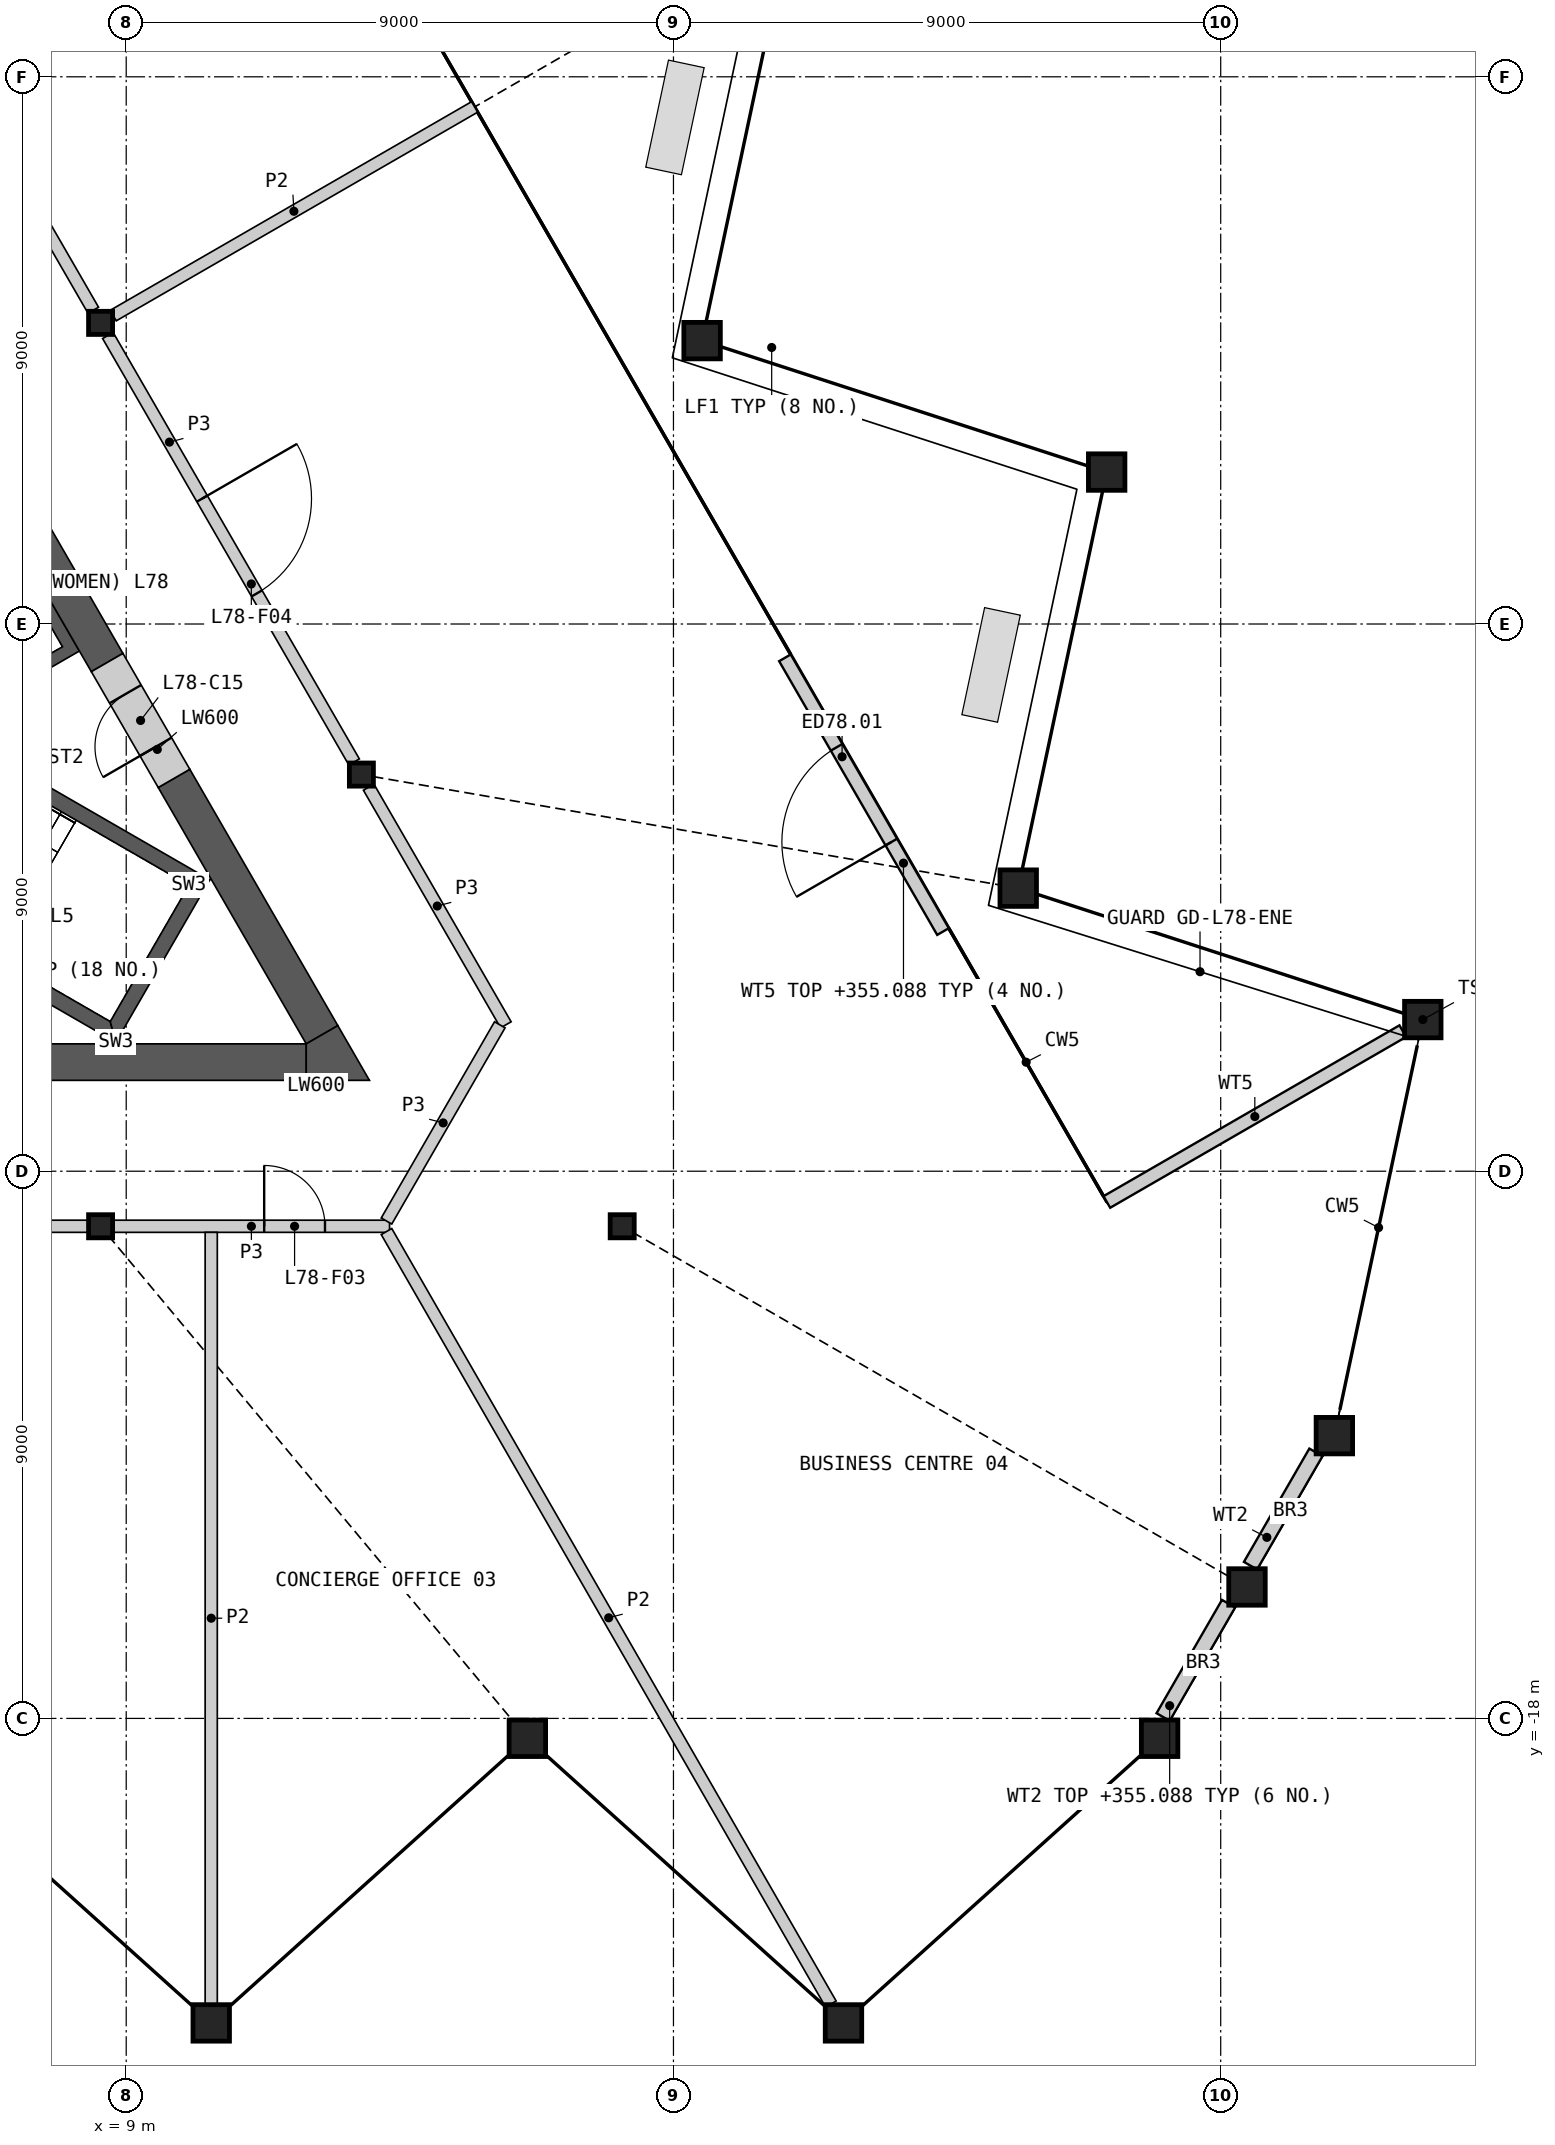
"""IFC4 building model, lengths in metres.
Left out: names, types, materials, properties, quantities, classifications, styles, units other than length and angle.
Written with IfcOpenShell. Run it as: python <this file> out.ifc"""

import sys

from ifc_helpers import new_model, si_unit, direction, frame, frame_2d, origin, origin_2d, place, context, subcontext, project, spatial, polyline, rectangle, hollow_rectangle, i_section, outline, extrude, element, fill, save


model = new_model("IFC4")
c1 = context("Model", 3, precision=1e-05, world=origin(), true_north=direction((0.0, 1.0)))
c2 = subcontext(c1, "Body", "Model", "MODEL_VIEW")
j1 = project(units=[si_unit("LENGTHUNIT", "METRE"), si_unit("PLANEANGLEUNIT", "RADIAN")], contexts=[c1])
p1 = place(None, origin())
s1 = spatial("IfcSite", under=j1, at=p1, CompositionType="ELEMENT")
p2 = place(p1, origin())
s2 = spatial("IfcBuilding", under=s1, at=p2, CompositionType="ELEMENT")
p3 = place(p2, frame((0.0, 0.0, 346.0)))
s3 = spatial("IfcBuildingStorey", under=s2, at=p3, CompositionType="ELEMENT", Elevation=346.0)
for number, where, z_axis, x_axis in (
    (1, (10.398, -23.008, 0.0), (0.0, 0.0, 1.0), (1.0, 0.0, 0.0)),
    (2, (15.597, -18.327, 0.0), (0.0, 0.0, 1.0), (1.0, 0.0, 0.0)),
    (3, (20.796, -23.008, 0.0), (0.0, 0.0, 1.0), (1.0, 0.0, 0.0)),
    (4, (25.995, -18.327, 0.0), (0.0, 0.0, 1.0), (1.0, 0.0, 0.0)),
    (5, (27.432, -15.838, 0.0), (0.0, 0.0, 1.0), (1.0, 0.0, 0.0)),
    (6, (28.869, -13.349, 0.0), (0.0, 0.0, 1.0), (1.0, 0.0, 0.0)),
    (7, (30.324, -6.506, 0.0), (0.0, 0.0, 1.0), (1.0, 0.0, 0.0)),
    (8, (23.67, -4.344, 0.0), (0.0, 0.0, 1.0), (1.0, 0.0, 0.0)),
    (9, (25.125, 2.499, 0.0), (0.0, 0.0, 1.0), (1.0, 0.0, 0.0)),
    (10, (18.471, 4.661, 0.0), (0.0, 0.0, 1.0), (1.0, 0.0, 0.0)),
):
    element("IfcColumn", number, at=place(p3, frame(where, z_axis=z_axis, x_axis=x_axis)), inside=s3, PredefinedType="COLUMN", context=c2, shape_type="SweptSolid", body=[
        extrude(hollow_rectangle(XDim=0.6, YDim=0.6, WallThickness=0.04, at=origin_2d()), origin(), (0.0, 0.0, 1.0), 10.0),
    ])
for number, where, z_axis, x_axis in (
    (11, (8.578, -9.906, 0.0), (0.0, 0.0, 1.0), (1.0, 0.0, 0.0)),
    (12, (17.157, -9.906, 0.0), (0.0, 0.0, 1.0), (1.0, 0.0, 0.0)),
    (13, (12.868, -2.476, 0.0), (0.0, 0.0, 1.0), (1.0, 0.0, 0.0)),
    (14, (8.578, 4.953, 0.0), (0.0, 0.0, 1.0), (1.0, 0.0, 0.0)),
):
    element("IfcColumn", number, at=place(p3, frame(where, z_axis=z_axis, x_axis=x_axis)), inside=s3, PredefinedType="COLUMN", context=c2, shape_type="SweptSolid", body=[
        extrude(i_section(OverallWidth=0.396, OverallDepth=0.381, WebThickness=0.019, FlangeThickness=0.03, at=origin_2d()), origin(), (0.0, 0.0, 1.0), 10.0),
    ])
for number, where, z_axis, x_axis in (
    (15, (26.053, -17.977, 0.0), (0.0, 0.0, 1.0), (0.5, 0.866, 0.0)),
    (16, (27.49, -15.488, 0.0), (0.0, 0.0, 1.0), (0.5, 0.866, 0.0)),
):
    element("IfcWall", number, at=place(p3, frame(where, z_axis=z_axis, x_axis=x_axis)), inside=s3, PredefinedType="SOLIDWALL", context=c2, shape_type="SweptSolid", body=[
        extrude(rectangle(XDim=2.152, YDim=0.25, at=frame_2d((1.076, 0.0))), origin(), (0.0, 0.0, 1.0), 9.088),
    ])
p4 = place(p3, frame((22.433, -5.059, 0.0), z_axis=(0.0, 0.0, 1.0), x_axis=(-0.499997499024, 0.866026847719, 0.0)))
e17 = element("IfcWall", 17, at=p4, inside=s3, PredefinedType="SOLIDWALL", context=c2, shape_type="SweptSolid", body=[
    extrude(rectangle(XDim=5.199, YDim=0.22, at=frame_2d((2.6, 0.0))), origin(), (0.0, 0.0, 1.0), 9.088),
])
p5 = place(p4, frame((1.699, 0.0, 0.0)))
e18 = element("IfcOpeningElement", 18, at=p5, cuts=e17, PredefinedType="OPENING", context=c2, shape_type="SweptSolid", body=[
    extrude(rectangle(XDim=1.8, YDim=2.4, at=frame_2d((0.9, 1.2))), frame((0.0, 0.12, 0.0), z_axis=(0.0, -1.0, 0.0), x_axis=(1.0, 0.0, 0.0)), (0.0, 0.0, 1.0), 0.24),
])
p6 = place(p3, frame((29.995, -6.696, 0.0), z_axis=(0.0, 0.0, 1.0), x_axis=(-0.866015577098, -0.500017019934, 0.0)))
e19 = element("IfcWall", 19, at=p6, inside=s3, PredefinedType="SOLIDWALL", context=c2, shape_type="SweptSolid", body=[
    extrude(rectangle(XDim=5.62, YDim=0.22, at=frame_2d((2.81, 0.0))), origin(), (0.0, 0.0, 1.0), 9.088),
])
p7 = place(p3, origin())
e20 = element("IfcWall", 20, at=p7, inside=s3, PredefinedType="SHEAR", context=c2, shape_type="SweptSolid", body=[
    extrude(outline(polyline([(1.561, 6.097), (3.731, 7.35), (8.231, -0.444), (6.061, -1.697), (5.96, -1.524), (7.952, -0.374), (6.952, 1.358), (4.96, 0.208), (4.861, 0.381), (6.852, 1.531), (5.852, 3.263), (3.861, 2.113), (3.76, 2.287), (5.752, 3.437), (4.752, 5.169), (2.76, 4.019), (2.66, 4.192), (4.652, 5.342), (3.652, 7.074), (1.66, 5.924), (1.561, 6.097)])), origin(), (0.0, 0.0, 1.0), 9.7),
])
p8 = place(p3, origin())
e21 = element("IfcWall", 21, at=p8, inside=s3, PredefinedType="SHEAR", context=c2, shape_type="SweptSolid", body=[
    extrude(outline(polyline([(3.763, -3.956), (8.83, -6.881), (8.738, -6.539), (3.888, -3.739), (3.763, -3.956)])), origin(), (0.0, 0.0, 1.0), 9.7),
])
p9 = place(p3, origin())
e22 = element("IfcWall", 22, at=p9, inside=s3, PredefinedType="SHEAR", context=c2, shape_type="SweptSolid", body=[
    extrude(outline(polyline([(8.83, -6.881), (10.374, -4.206), (10.032, -4.298), (8.738, -6.539), (8.83, -6.881)])), origin(), (0.0, 0.0, 1.0), 9.7),
])
p10 = place(p3, origin())
e23 = element("IfcWall", 23, at=p10, inside=s3, PredefinedType="SHEAR", context=c2, shape_type="SweptSolid", body=[
    extrude(outline(polyline([(10.032, -4.298), (10.374, -4.206), (5.307, -1.281), (5.182, -1.498), (10.032, -4.298)])), origin(), (0.0, 0.0, 1.0), 9.7),
])
for number, where, z_axis, x_axis in (
    (24, (-4.892, -7.206, 0.0), (0.0, 0.0, 1.0), (1.0, 0.0, 0.0)),
    (25, (8.686, -0.634, 0.0), (0.0, 0.0, 1.0), (-0.5, 0.866, 0.0)),
):
    element("IfcWall", number, at=place(p3, frame(where, z_axis=z_axis, x_axis=x_axis)), inside=s3, PredefinedType="SHEAR", context=c2, shape_type="SweptSolid", body=[
        extrude(rectangle(XDim=16.853, YDim=0.6, at=frame_2d((8.426, 0.0))), origin(), (0.0, 0.0, 1.0), 9.7),
    ])
p11 = place(p3, frame((12.221, -6.756, 0.0), z_axis=(0.0, 0.0, 1.0), x_axis=(-0.50000604952, 0.866021911064, 0.0)))
e26 = element("IfcWall", 26, at=p11, inside=s3, PredefinedType="SHEAR", context=c2, shape_type="SweptSolid", body=[
    extrude(rectangle(XDim=4.869, YDim=0.6, at=frame_2d((2.434, 0.0))), origin(), (0.0, 0.0, 1.0), 9.7),
])
p12 = place(p3, origin())
e27 = element("IfcWall", 27, at=p12, inside=s3, PredefinedType="SHEAR", context=c2, shape_type="SweptSolid", body=[
    extrude(outline(polyline([(11.961, -7.506), (11.961, -6.906), (12.48, -6.606), (13.0, -7.506), (11.961, -7.506)])), origin(), (0.0, 0.0, 1.0), 9.7),
])
p13 = place(p3, frame((9.786, -2.539, 0.0), z_axis=(0.0, 0.0, 1.0), x_axis=(-0.499981787252, 0.866035918664, 0.0)))
e28 = element("IfcWall", 28, at=p13, inside=s3, PredefinedType="SHEAR", context=c2, shape_type="SweptSolid", body=[
    extrude(rectangle(XDim=2.2, YDim=0.6, at=frame_2d((1.1, 0.0))), origin(), (0.0, 0.0, 1.0), 9.7),
])
p14 = place(p13, frame((0.6, 0.0, 0.0)))
e29 = element("IfcOpeningElement", 29, at=p14, cuts=e28, PredefinedType="OPENING", context=c2, shape_type="SweptSolid", body=[
    extrude(rectangle(XDim=1.0, YDim=2.1, at=frame_2d((0.5, 1.05))), frame((0.0, 0.31, 0.0), z_axis=(0.0, -1.0, 0.0), x_axis=(1.0, 0.0, 0.0)), (0.0, 0.0, 1.0), 0.62),
])
p15 = place(p3, frame((0.208, -9.906, 0.0), z_axis=(0.0, 0.0, 1.0), x_axis=(1.0, 0.0, 0.0)))
e30 = element("IfcWall", 30, at=p15, inside=s3, PredefinedType="PARTITIONING", context=c2, shape_type="SweptSolid", body=[
    extrude(rectangle(XDim=8.163, YDim=0.2, at=frame_2d((4.082, 0.0))), origin(), (0.0, 0.0, 1.0), 9.7),
])
p16 = place(p15, frame((3.582, 0.0, 0.0)))
e31 = element("IfcOpeningElement", 31, at=p16, cuts=e30, PredefinedType="OPENING", context=c2, shape_type="SweptSolid", body=[
    extrude(rectangle(XDim=1.0, YDim=2.1, at=frame_2d((0.5, 1.05))), frame((0.0, 0.11, 0.0), z_axis=(0.0, -1.0, 0.0), x_axis=(1.0, 0.0, 0.0)), (0.0, 0.0, 1.0), 0.22),
])
p17 = place(p3, frame((4.409, 12.174, 0.0), z_axis=(0.0, 0.0, 1.0), x_axis=(0.499984266882, -0.866034487114, 0.0)))
e32 = element("IfcWall", 32, at=p17, inside=s3, PredefinedType="PARTITIONING", context=c2, shape_type="SweptSolid", body=[
    extrude(rectangle(XDim=8.099, YDim=0.2, at=frame_2d((4.049, 0.0))), origin(), (0.0, 0.0, 1.0), 9.7),
])
p18 = place(p17, frame((3.099, 0.0, 0.0)))
e33 = element("IfcOpeningElement", 33, at=p18, cuts=e32, PredefinedType="OPENING", context=c2, shape_type="SweptSolid", body=[
    extrude(rectangle(XDim=1.8, YDim=2.1, at=frame_2d((0.9, 1.05))), frame((0.0, 0.11, 0.0), z_axis=(0.0, -1.0, 0.0), x_axis=(1.0, 0.0, 0.0)), (0.0, 0.0, 1.0), 0.22),
])
p19 = place(p3, frame((8.698, 4.745, 0.0), z_axis=(0.0, 0.0, 1.0), x_axis=(0.499984266882, -0.866034487114, 0.0)))
e34 = element("IfcWall", 34, at=p19, inside=s3, PredefinedType="PARTITIONING", context=c2, shape_type="SweptSolid", body=[
    extrude(rectangle(XDim=8.099, YDim=0.2, at=frame_2d((4.049, 0.0))), origin(), (0.0, 0.0, 1.0), 9.7),
])
p20 = place(p19, frame((3.099, 0.0, 0.0)))
e35 = element("IfcOpeningElement", 35, at=p20, cuts=e34, PredefinedType="OPENING", context=c2, shape_type="SweptSolid", body=[
    extrude(rectangle(XDim=1.8, YDim=2.1, at=frame_2d((0.9, 1.05))), frame((0.0, 0.11, 0.0), z_axis=(0.0, -1.0, 0.0), x_axis=(1.0, 0.0, 0.0)), (0.0, 0.0, 1.0), 0.22),
])
p21 = place(p3, frame((8.786, -9.906, 0.0), z_axis=(0.0, 0.0, 1.0), x_axis=(1.0, 0.0, 0.0)))
e36 = element("IfcWall", 36, at=p21, inside=s3, PredefinedType="PARTITIONING", context=c2, shape_type="SweptSolid", body=[
    extrude(rectangle(XDim=4.545, YDim=0.2, at=frame_2d((2.272, 0.0))), origin(), (0.0, 0.0, 1.0), 9.7),
])
p22 = place(p21, frame((2.483, 0.0, 0.0)))
e37 = element("IfcOpeningElement", 37, at=p22, cuts=e36, PredefinedType="OPENING", context=c2, shape_type="SweptSolid", body=[
    extrude(rectangle(XDim=1.0, YDim=2.1, at=frame_2d((0.5, 1.05))), frame((0.0, 0.11, 0.0), z_axis=(0.0, -1.0, 0.0), x_axis=(1.0, 0.0, 0.0)), (0.0, 0.0, 1.0), 0.22),
])
p23 = place(p3, frame((12.988, -2.684, 0.0), z_axis=(0.0, 0.0, 1.0), x_axis=(0.49999094734, -0.866030630277, 0.0)))
e38 = element("IfcWall", 38, at=p23, inside=s3, PredefinedType="PARTITIONING", context=c2, shape_type="SweptSolid", body=[
    extrude(rectangle(XDim=4.513, YDim=0.2, at=frame_2d((2.256, 0.0))), origin(), (0.0, 0.0, 1.0), 9.7),
])
p24 = place(p3, frame((13.281, -9.819, 0.0), z_axis=(0.0, 0.0, 1.0), x_axis=(0.499958791762, 0.866049194065, 0.0)))
e39 = element("IfcWall", 39, at=p24, inside=s3, PredefinedType="PARTITIONING", context=c2, shape_type="SweptSolid", body=[
    extrude(rectangle(XDim=3.726, YDim=0.2, at=frame_2d((1.863, 0.0))), origin(), (0.0, 0.0, 1.0), 9.7),
])
p25 = place(p3, frame((13.281, -9.992, 0.0), z_axis=(0.0, 0.0, 1.0), x_axis=(0.498599735937, -0.866832338646, 0.0)))
e40 = element("IfcWall", 40, at=p25, inside=s3, PredefinedType="PARTITIONING", context=c2, shape_type="SweptSolid", body=[
    extrude(rectangle(XDim=14.658, YDim=0.2, at=frame_2d((7.329, 0.0))), origin(), (0.0, 0.0, 1.0), 8.93),
])
p26 = place(p3, frame((10.398, -22.698, 0.0), z_axis=(0.0, 0.0, 1.0), x_axis=(0.0, 1.0, 0.0)))
e41 = element("IfcWall", 41, at=p26, inside=s3, PredefinedType="PARTITIONING", context=c2, shape_type="SweptSolid", body=[
    extrude(rectangle(XDim=12.692, YDim=0.2, at=frame_2d((6.346, 0.0))), origin(), (0.0, 0.0, 1.0), 8.93),
])
p27 = place(p3, frame((8.786, 5.073, 0.0), z_axis=(0.0, 0.0, 1.0), x_axis=(0.866041038191, 0.499972919436, 0.0)))
e42 = element("IfcWall", 42, at=p27, inside=s3, PredefinedType="PARTITIONING", context=c2, shape_type="SweptSolid", body=[
    extrude(rectangle(XDim=6.863, YDim=0.2, at=frame_2d((3.431, 0.0))), origin(), (0.0, 0.0, 1.0), 8.93),
])
p28 = place(p5, origin())
e43 = element("IfcDoor", 43, at=p28, inside=s3, OperationType="DOUBLE_DOOR_SINGLE_SWING", PredefinedType="DOOR", context=c2, shape_type="SweptSolid", body=[
    extrude(rectangle(XDim=1.8, YDim=2.4, at=frame_2d((0.9, 1.2))), frame((0.0, 0.025, 0.0), z_axis=(0.0, -1.0, 0.0), x_axis=(1.0, 0.0, 0.0)), (0.0, 0.0, 1.0), 0.05),
])
fill(e18, e43)
p29 = place(p14, origin())
e44 = element("IfcDoor", 44, at=p29, inside=s3, OperationType="SINGLE_SWING_LEFT", PredefinedType="DOOR", context=c2, shape_type="SweptSolid", body=[
    extrude(rectangle(XDim=1.0, YDim=2.1, at=frame_2d((0.5, 1.05))), frame((0.0, 0.055, 0.0), z_axis=(0.0, -1.0, 0.0), x_axis=(1.0, 0.0, 0.0)), (0.0, 0.0, 1.0), 0.05),
])
fill(e29, e44)
p30 = place(p22, origin())
e45 = element("IfcDoor", 45, at=p30, inside=s3, OperationType="SINGLE_SWING_LEFT", PredefinedType="DOOR", context=c2, shape_type="SweptSolid", body=[
    extrude(rectangle(XDim=1.0, YDim=2.1, at=frame_2d((0.5, 1.05))), frame((0.0, 0.025, 0.0), z_axis=(0.0, -1.0, 0.0), x_axis=(1.0, 0.0, 0.0)), (0.0, 0.0, 1.0), 0.05),
])
fill(e37, e45)
p31 = place(p20, origin())
e46 = element("IfcDoor", 46, at=p31, inside=s3, OperationType="DOUBLE_DOOR_SINGLE_SWING", PredefinedType="DOOR", context=c2, shape_type="SweptSolid", body=[
    extrude(rectangle(XDim=1.8, YDim=2.1, at=frame_2d((0.9, 1.05))), frame((0.0, 0.025, 0.0), z_axis=(0.0, -1.0, 0.0), x_axis=(1.0, 0.0, 0.0)), (0.0, 0.0, 1.0), 0.05),
])
fill(e35, e46)
save(model, sys.argv[1])
